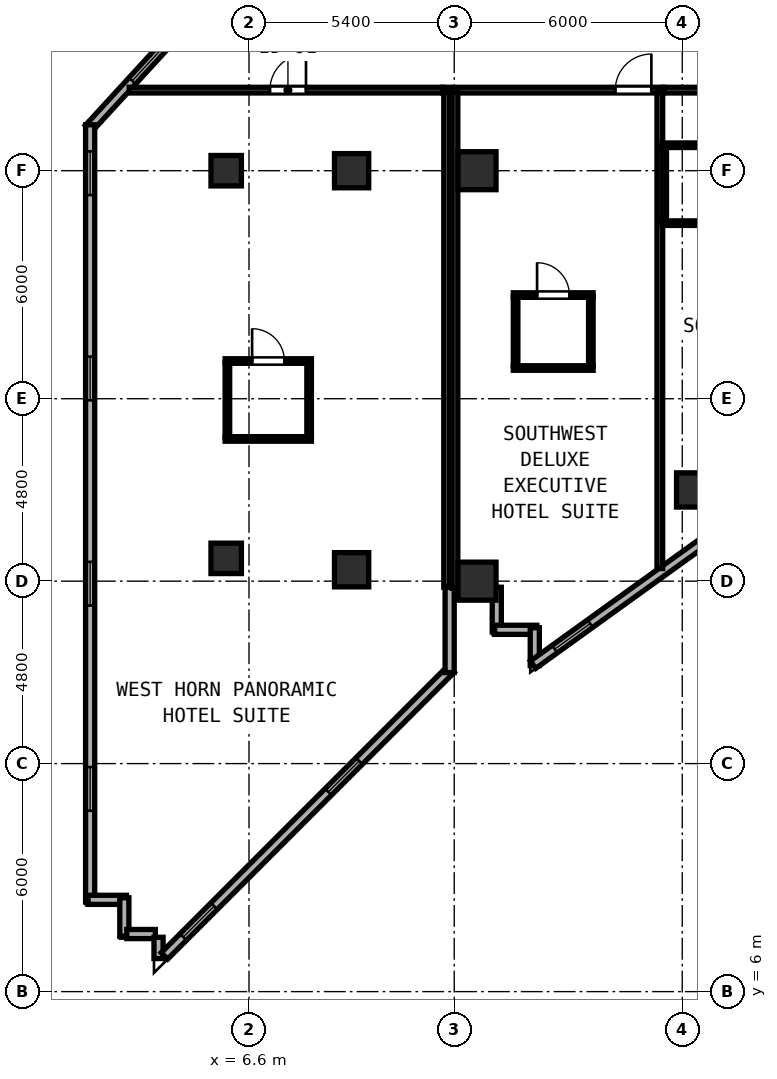
"""IFC4 building model, lengths in metres.
Left out: names, types, materials, properties, quantities, classifications, styles, units other than length and angle.
Written with IfcOpenShell. Run it as: python <this file> out.ifc"""

import sys

from ifc_helpers import new_model, si_unit, direction, frame, frame_2d, origin, origin_2d, place, context, subcontext, project, spatial, rectangle, hollow_rectangle, extrude, element, fill, save


model = new_model("IFC4")
c1 = context("Model", 3, precision=1e-05, world=origin(), true_north=direction((0.0, 1.0)))
c2 = subcontext(c1, "Body", "Model", "MODEL_VIEW")
j1 = project(units=[si_unit("LENGTHUNIT", "METRE"), si_unit("PLANEANGLEUNIT", "RADIAN")], contexts=[c1])
p1 = place(None, origin())
s1 = spatial("IfcSite", under=j1, at=p1, CompositionType="ELEMENT")
p2 = place(p1, origin())
s2 = spatial("IfcBuilding", under=s1, at=p2, CompositionType="ELEMENT")
p3 = place(p2, frame((0.0, 0.0, 113.6)))
s3 = spatial("IfcBuildingStorey", under=s2, at=p3, CompositionType="ELEMENT", Elevation=113.6)
for number, where, z_axis, x_axis in (
    (1, (12.6, 16.8, 0.0), (0.0, 0.0, 1.0), (1.0, 0.0, 0.0)),
    (2, (12.6, 27.6, 0.0), (0.0, 0.0, 1.0), (1.0, 0.0, 0.0)),
):
    element("IfcColumn", number, at=place(p3, frame(where, z_axis=z_axis, x_axis=x_axis)), inside=s3, PredefinedType="COLUMN", context=c2, shape_type="SweptSolid", body=[
        extrude(hollow_rectangle(XDim=1.0, YDim=1.0, WallThickness=0.038, at=origin_2d()), origin(), (0.0, 0.0, 1.0), 3.8),
    ])
for number, where, z_axis, x_axis in (
    (3, (6.0, 17.4, 0.0), (0.0, 0.0, 1.0), (1.0, 0.0, 0.0)),
    (4, (6.0, 27.6, 0.0), (0.0, 0.0, 1.0), (1.0, 0.0, 0.0)),
):
    element("IfcColumn", number, at=place(p3, frame(where, z_axis=z_axis, x_axis=x_axis)), inside=s3, PredefinedType="COLUMN", context=c2, shape_type="SweptSolid", body=[
        extrude(hollow_rectangle(XDim=0.8, YDim=0.8, WallThickness=0.03, at=origin_2d()), origin(), (0.0, 0.0, 1.0), 3.8),
    ])
for number, where, z_axis, x_axis in (
    (5, (18.3, 19.2, 0.0), (0.0, 0.0, 1.0), (1.0, 0.0, 0.0)),
    (6, (9.3, 17.1, 0.0), (0.0, 0.0, 1.0), (1.0, 0.0, 0.0)),
    (7, (9.3, 27.6, 0.0), (0.0, 0.0, 1.0), (1.0, 0.0, 0.0)),
):
    element("IfcColumn", number, at=place(p3, frame(where, z_axis=z_axis, x_axis=x_axis)), inside=s3, PredefinedType="COLUMN", context=c2, shape_type="SweptSolid", body=[
        extrude(hollow_rectangle(XDim=0.9, YDim=0.9, WallThickness=0.034, at=origin_2d()), origin(), (0.0, 0.0, 1.0), 3.8),
    ])
p4 = place(p3, frame((13.12, 16.64, 0.0), z_axis=(0.0, 0.0, 1.0), x_axis=(0.0, -1.0, 0.0)))
e8 = element("IfcWall", 8, at=p4, inside=s3, PredefinedType="SOLIDWALL", context=c2, shape_type="SweptSolid", body=[
    extrude(rectangle(XDim=1.175, YDim=0.24, at=frame_2d((0.587, 0.0))), origin(), (0.0, 0.0, 1.0), 3.6),
])
p5 = place(p3, frame((13.065, 15.52, 0.0), z_axis=(0.0, 0.0, 1.0), x_axis=(1.0, 0.0, 0.0)))
e9 = element("IfcWall", 9, at=p5, inside=s3, PredefinedType="SOLIDWALL", context=c2, shape_type="SweptSolid", body=[
    extrude(rectangle(XDim=1.11, YDim=0.24, at=frame_2d((0.555, 0.0))), origin(), (0.0, 0.0, 1.0), 3.6),
])
p6 = place(p3, frame((14.12, 15.575, 0.0), z_axis=(0.0, 0.0, 1.0), x_axis=(0.0, -1.0, 0.0)))
e10 = element("IfcWall", 10, at=p6, inside=s3, PredefinedType="SOLIDWALL", context=c2, shape_type="SweptSolid", body=[
    extrude(rectangle(XDim=0.996, YDim=0.24, at=frame_2d((0.498, 0.0))), origin(), (0.0, 0.0, 1.0), 3.6),
])
p7 = place(p3, frame((14.075, 14.602, 0.0), z_axis=(0.0, 0.0, 1.0), x_axis=(0.811543504691, 0.584291998913, 0.0)))
e11 = element("IfcWall", 11, at=p7, inside=s3, PredefinedType="SOLIDWALL", context=c2, shape_type="SweptSolid", body=[
    extrude(rectangle(XDim=11.623, YDim=0.24, at=frame_2d((5.812, 0.0))), origin(), (0.0, 0.0, 1.0), 3.145),
])
p8 = place(p7, frame((0.7, 0.0, 0.85)))
e12 = element("IfcOpeningElement", 12, at=p8, cuts=e11, PredefinedType="OPENING", context=c2, shape_type="SweptSolid", body=[
    extrude(rectangle(XDim=1.15, YDim=1.8, at=frame_2d((0.575, 0.9))), frame((0.0, 0.13, 0.0), z_axis=(0.0, -1.0, 0.0), x_axis=(1.0, 0.0, 0.0)), (0.0, 0.0, 1.0), 0.26),
])
p9 = place(p7, frame((6.1, 0.0, 0.85)))
e13 = element("IfcOpeningElement", 13, at=p9, cuts=e11, PredefinedType="OPENING", context=c2, shape_type="SweptSolid", body=[
    extrude(rectangle(XDim=1.15, YDim=1.8, at=frame_2d((0.575, 0.9))), frame((0.0, 0.13, 0.0), z_axis=(0.0, -1.0, 0.0), x_axis=(1.0, 0.0, 0.0)), (0.0, 0.0, 1.0), 0.26),
])
p10 = place(p3, frame((4.604, 31.136, 0.0), z_axis=(0.0, 0.0, 1.0), x_axis=(-0.675727991777, -0.737151057198, 0.0)))
e14 = element("IfcWall", 14, at=p10, inside=s3, PredefinedType="SOLIDWALL", context=c2, shape_type="SweptSolid", body=[
    extrude(rectangle(XDim=3.287, YDim=0.24, at=frame_2d((1.644, 0.0))), origin(), (0.0, 0.0, 1.0), 3.6),
])
p11 = place(p10, frame((0.439, 0.0, 0.85)))
e15 = element("IfcOpeningElement", 15, at=p11, cuts=e14, PredefinedType="OPENING", context=c2, shape_type="SweptSolid", body=[
    extrude(rectangle(XDim=1.15, YDim=1.8, at=frame_2d((0.575, 0.9))), frame((0.0, 0.13, 0.0), z_axis=(0.0, -1.0, 0.0), x_axis=(1.0, 0.0, 0.0)), (0.0, 0.0, 1.0), 0.26),
])
p12 = place(p3, frame((2.42, 28.808, 0.0), z_axis=(0.0, 0.0, 1.0), x_axis=(0.0, -1.0, 0.0)))
e16 = element("IfcWall", 16, at=p12, inside=s3, PredefinedType="SOLIDWALL", context=c2, shape_type="SweptSolid", body=[
    extrude(rectangle(XDim=20.448, YDim=0.24, at=frame_2d((10.224, 0.0))), origin(), (0.0, 0.0, 1.0), 3.6),
])
p13 = place(p12, frame((0.7, 0.0, 0.85)))
e17 = element("IfcOpeningElement", 17, at=p13, cuts=e16, PredefinedType="OPENING", context=c2, shape_type="SweptSolid", body=[
    extrude(rectangle(XDim=1.15, YDim=1.8, at=frame_2d((0.575, 0.9))), frame((0.0, 0.13, 0.0), z_axis=(0.0, -1.0, 0.0), x_axis=(1.0, 0.0, 0.0)), (0.0, 0.0, 1.0), 0.26),
])
p14 = place(p12, frame((6.1, 0.0, 0.85)))
e18 = element("IfcOpeningElement", 18, at=p14, cuts=e16, PredefinedType="OPENING", context=c2, shape_type="SweptSolid", body=[
    extrude(rectangle(XDim=1.15, YDim=1.8, at=frame_2d((0.575, 0.9))), frame((0.0, 0.13, 0.0), z_axis=(0.0, -1.0, 0.0), x_axis=(1.0, 0.0, 0.0)), (0.0, 0.0, 1.0), 0.26),
])
p15 = place(p12, frame((11.5, 0.0, 0.85)))
e19 = element("IfcOpeningElement", 19, at=p15, cuts=e16, PredefinedType="OPENING", context=c2, shape_type="SweptSolid", body=[
    extrude(rectangle(XDim=1.15, YDim=1.8, at=frame_2d((0.575, 0.9))), frame((0.0, 0.13, 0.0), z_axis=(0.0, -1.0, 0.0), x_axis=(1.0, 0.0, 0.0)), (0.0, 0.0, 1.0), 0.26),
])
p16 = place(p12, frame((16.9, 0.0, 0.85)))
e20 = element("IfcOpeningElement", 20, at=p16, cuts=e16, PredefinedType="OPENING", context=c2, shape_type="SweptSolid", body=[
    extrude(rectangle(XDim=1.15, YDim=1.8, at=frame_2d((0.575, 0.9))), frame((0.0, 0.13, 0.0), z_axis=(0.0, -1.0, 0.0), x_axis=(1.0, 0.0, 0.0)), (0.0, 0.0, 1.0), 0.26),
])
for number, where, z_axis, x_axis in (
    (21, (2.365, 8.415, 0.0), (0.0, 0.0, 1.0), (1.0, 0.0, 0.0)),
    (22, (3.32, 8.47, 0.0), (0.0, 0.0, 1.0), (0.0, -1.0, 0.0)),
):
    element("IfcWall", number, at=place(p3, frame(where, z_axis=z_axis, x_axis=x_axis)), inside=s3, PredefinedType="SOLIDWALL", context=c2, shape_type="SweptSolid", body=[
        extrude(rectangle(XDim=1.01, YDim=0.24, at=frame_2d((0.505, 0.0))), origin(), (0.0, 0.0, 1.0), 3.6),
    ])
p17 = place(p3, frame((3.385, 7.515, 0.0), z_axis=(0.0, 0.0, 1.0), x_axis=(1.0, 0.0, 0.0)))
e23 = element("IfcWall", 23, at=p17, inside=s3, PredefinedType="SOLIDWALL", context=c2, shape_type="SweptSolid", body=[
    extrude(rectangle(XDim=0.75, YDim=0.24, at=frame_2d((0.375, 0.0))), origin(), (0.0, 0.0, 1.0), 3.6),
])
p18 = place(p3, frame((4.22, 7.43, 0.0), z_axis=(0.0, 0.0, 1.0), x_axis=(0.0, -1.0, 0.0)))
e24 = element("IfcWall", 24, at=p18, inside=s3, PredefinedType="SOLIDWALL", context=c2, shape_type="SweptSolid", body=[
    extrude(rectangle(XDim=0.56, YDim=0.24, at=frame_2d((0.28, 0.0))), origin(), (0.0, 0.0, 1.0), 3.6),
])
p19 = place(p3, frame((4.375, 6.94, 0.0), z_axis=(0.0, 0.0, 1.0), x_axis=(0.706889405259, 0.70732409031, 0.0)))
e25 = element("IfcWall", 25, at=p19, inside=s3, PredefinedType="SOLIDWALL", context=c2, shape_type="SweptSolid", body=[
    extrude(rectangle(XDim=10.671, YDim=0.24, at=frame_2d((5.336, 0.0))), origin(), (0.0, 0.0, 1.0), 3.6),
])
p20 = place(p19, frame((0.7, 0.0, 0.85)))
e26 = element("IfcOpeningElement", 26, at=p20, cuts=e25, PredefinedType="OPENING", context=c2, shape_type="SweptSolid", body=[
    extrude(rectangle(XDim=1.15, YDim=1.8, at=frame_2d((0.575, 0.9))), frame((0.0, 0.13, 0.0), z_axis=(0.0, -1.0, 0.0), x_axis=(1.0, 0.0, 0.0)), (0.0, 0.0, 1.0), 0.26),
])
p21 = place(p19, frame((6.1, 0.0, 0.85)))
e27 = element("IfcOpeningElement", 27, at=p21, cuts=e25, PredefinedType="OPENING", context=c2, shape_type="SweptSolid", body=[
    extrude(rectangle(XDim=1.15, YDim=1.8, at=frame_2d((0.575, 0.9))), frame((0.0, 0.13, 0.0), z_axis=(0.0, -1.0, 0.0), x_axis=(1.0, 0.0, 0.0)), (0.0, 0.0, 1.0), 0.26),
])
p22 = place(p3, frame((11.88, 14.395, 0.0), z_axis=(0.0, 0.0, 1.0), x_axis=(0.0, 1.0, 0.0)))
e28 = element("IfcWall", 28, at=p22, inside=s3, PredefinedType="SOLIDWALL", context=c2, shape_type="SweptSolid", body=[
    extrude(rectangle(XDim=2.245, YDim=0.24, at=frame_2d((1.123, 0.0))), origin(), (0.0, 0.0, 1.0), 3.6),
])
p23 = place(p3, frame((11.7, 29.72, 0.0), z_axis=(0.0, 0.0, 1.0), x_axis=(1.0, 0.0, 0.0)))
e29 = element("IfcWall", 29, at=p23, inside=s3, PredefinedType="PARTITIONING", context=c2, shape_type="SweptSolid", body=[
    extrude(rectangle(XDim=5.81, YDim=0.15, at=frame_2d((2.905, 0.0))), origin(), (0.0, 0.0, 1.0), 3.6),
])
p24 = place(p23, frame((5.488, 0.0, 0.0), z_axis=(0.0, 0.0, 1.0), x_axis=(-1.0, 0.0, 0.0)))
e30 = element("IfcOpeningElement", 30, at=p24, cuts=e29, PredefinedType="OPENING", context=c2, shape_type="SweptSolid", body=[
    extrude(rectangle(XDim=0.95, YDim=2.18, at=frame_2d((0.475, 1.09))), frame((0.0, 0.085, 0.0), z_axis=(0.0, -1.0, 0.0), x_axis=(1.0, 0.0, 0.0)), (0.0, 0.0, 1.0), 0.17),
])
p25 = place(p3, frame((11.8, 16.642, 0.0), z_axis=(0.0, 0.0, 1.0), x_axis=(0.0, 1.0, 0.0)))
e31 = element("IfcWall", 31, at=p25, inside=s3, PredefinedType="PARTITIONING", context=c2, shape_type="SweptSolid", body=[
    extrude(rectangle(XDim=13.018, YDim=0.15, at=frame_2d((6.509, 0.0))), origin(), (0.0, 0.0, 1.0), 3.6),
])
p26 = place(p3, frame((17.41, 17.133, 0.0), z_axis=(0.0, 0.0, 1.0), x_axis=(0.0, 1.0, 0.0)))
e32 = element("IfcWall", 32, at=p26, inside=s3, PredefinedType="PARTITIONING", context=c2, shape_type="SweptSolid", body=[
    extrude(rectangle(XDim=12.527, YDim=0.15, at=frame_2d((6.264, 0.0))), origin(), (0.0, 0.0, 1.0), 3.6),
])
p27 = place(p3, frame((13.555, 24.328, 0.0), z_axis=(0.0, 0.0, 1.0), x_axis=(1.0, 0.0, 0.0)))
e33 = element("IfcWall", 33, at=p27, inside=s3, PredefinedType="PARTITIONING", context=c2, shape_type="SweptSolid", body=[
    extrude(rectangle(XDim=2.1, YDim=0.12, at=frame_2d((1.05, 0.0))), origin(), (0.0, 0.0, 1.0), 3.6),
])
p28 = place(p27, frame((1.475, 0.0, 0.0), z_axis=(0.0, 0.0, 1.0), x_axis=(-1.0, 0.0, 0.0)))
e34 = element("IfcOpeningElement", 34, at=p28, cuts=e33, PredefinedType="OPENING", context=c2, shape_type="SweptSolid", body=[
    extrude(rectangle(XDim=0.85, YDim=2.1, at=frame_2d((0.425, 1.05))), frame((0.0, 0.07, 0.0), z_axis=(0.0, -1.0, 0.0), x_axis=(1.0, 0.0, 0.0)), (0.0, 0.0, 1.0), 0.14),
])
p29 = place(p3, frame((13.555, 22.408, 0.0), z_axis=(0.0, 0.0, 1.0), x_axis=(1.0, 0.0, 0.0)))
e35 = element("IfcWall", 35, at=p29, inside=s3, PredefinedType="PARTITIONING", context=c2, shape_type="SweptSolid", body=[
    extrude(rectangle(XDim=2.1, YDim=0.12, at=frame_2d((1.05, 0.0))), origin(), (0.0, 0.0, 1.0), 3.6),
])
for number, where, z_axis, x_axis in (
    (36, (13.615, 22.453, 0.0), (0.0, 0.0, 1.0), (0.0, 1.0, 0.0)),
    (37, (15.595, 22.453, 0.0), (0.0, 0.0, 1.0), (0.0, 1.0, 0.0)),
):
    element("IfcWall", number, at=place(p3, frame(where, z_axis=z_axis, x_axis=x_axis)), inside=s3, PredefinedType="PARTITIONING", context=c2, shape_type="SweptSolid", body=[
        extrude(rectangle(XDim=1.83, YDim=0.12, at=frame_2d((0.915, 0.0))), origin(), (0.0, 0.0, 1.0), 3.6),
    ])
p30 = place(p3, frame((17.512, 29.72, 0.0), z_axis=(0.0, 0.0, 1.0), x_axis=(1.0, 0.0, 0.0)))
e38 = element("IfcWall", 38, at=p30, inside=s3, PredefinedType="PARTITIONING", context=c2, shape_type="SweptSolid", body=[
    extrude(rectangle(XDim=6.406, YDim=0.15, at=frame_2d((3.203, 0.0))), origin(), (0.0, 0.0, 1.0), 3.6),
])
p31 = place(p30, frame((2.755, 0.0, 0.0), z_axis=(0.0, 0.0, 1.0), x_axis=(-1.0, 0.0, 0.0)))
e39 = element("IfcOpeningElement", 39, at=p31, cuts=e38, PredefinedType="OPENING", context=c2, shape_type="SweptSolid", body=[
    extrude(rectangle(XDim=0.95, YDim=2.18, at=frame_2d((0.475, 1.09))), frame((0.0, 0.085, 0.0), z_axis=(0.0, -1.0, 0.0), x_axis=(1.0, 0.0, 0.0)), (0.0, 0.0, 1.0), 0.17),
])
for number, where, z_axis, x_axis in (
    (40, (17.47, 28.27, 0.0), (0.0, 0.0, 1.0), (1.0, 0.0, 0.0)),
    (41, (17.47, 26.22, 0.0), (0.0, 0.0, 1.0), (1.0, 0.0, 0.0)),
):
    element("IfcWall", number, at=place(p3, frame(where, z_axis=z_axis, x_axis=x_axis)), inside=s3, PredefinedType="PARTITIONING", context=c2, shape_type="SweptSolid", body=[
        extrude(rectangle(XDim=2.265, YDim=0.12, at=frame_2d((1.133, 0.0))), origin(), (0.0, 0.0, 1.0), 3.6),
    ])
p32 = place(p3, frame((17.525, 26.265, 0.0), z_axis=(0.0, 0.0, 1.0), x_axis=(0.0, 1.0, 0.0)))
e42 = element("IfcWall", 42, at=p32, inside=s3, PredefinedType="PARTITIONING", context=c2, shape_type="SweptSolid", body=[
    extrude(rectangle(XDim=1.96, YDim=0.12, at=frame_2d((0.98, 0.0))), origin(), (0.0, 0.0, 1.0), 3.6),
])
p33 = place(p3, frame((3.448, 29.72, 0.0), z_axis=(0.0, 0.0, 1.0), x_axis=(1.0, 0.0, 0.0)))
e43 = element("IfcWall", 43, at=p33, inside=s3, PredefinedType="PARTITIONING", context=c2, shape_type="SweptSolid", body=[
    extrude(rectangle(XDim=8.25, YDim=0.15, at=frame_2d((4.125, 0.0))), origin(), (0.0, 0.0, 1.0), 3.6),
])
p34 = place(p33, frame((4.651, 0.0, 0.0), z_axis=(0.0, 0.0, 1.0), x_axis=(-1.0, 0.0, 0.0)))
e44 = element("IfcOpeningElement", 44, at=p34, cuts=e43, PredefinedType="OPENING", context=c2, shape_type="SweptSolid", body=[
    extrude(rectangle(XDim=0.95, YDim=2.18, at=frame_2d((0.475, 1.09))), frame((0.0, 0.085, 0.0), z_axis=(0.0, -1.0, 0.0), x_axis=(1.0, 0.0, 0.0)), (0.0, 0.0, 1.0), 0.17),
])
p35 = place(p3, frame((12.02, 16.612, 0.0), z_axis=(0.0, 0.0, 1.0), x_axis=(0.0, 1.0, 0.0)))
e45 = element("IfcWall", 45, at=p35, inside=s3, PredefinedType="PARTITIONING", context=c2, shape_type="SweptSolid", body=[
    extrude(rectangle(XDim=13.048, YDim=0.15, at=frame_2d((6.524, 0.0))), origin(), (0.0, 0.0, 1.0), 3.6),
])
p36 = place(p3, frame((5.972, 22.592, 0.0), z_axis=(0.0, 0.0, 1.0), x_axis=(1.0, 0.0, 0.0)))
e46 = element("IfcWall", 46, at=p36, inside=s3, PredefinedType="PARTITIONING", context=c2, shape_type="SweptSolid", body=[
    extrude(rectangle(XDim=2.27, YDim=0.12, at=frame_2d((1.135, 0.0))), origin(), (0.0, 0.0, 1.0), 3.6),
])
p37 = place(p36, frame((1.56, 0.0, 0.0), z_axis=(0.0, 0.0, 1.0), x_axis=(-1.0, 0.0, 0.0)))
e47 = element("IfcOpeningElement", 47, at=p37, cuts=e46, PredefinedType="OPENING", context=c2, shape_type="SweptSolid", body=[
    extrude(rectangle(XDim=0.85, YDim=2.1, at=frame_2d((0.425, 1.05))), frame((0.0, 0.07, 0.0), z_axis=(0.0, -1.0, 0.0), x_axis=(1.0, 0.0, 0.0)), (0.0, 0.0, 1.0), 0.14),
])
p38 = place(p3, frame((5.972, 20.542, 0.0), z_axis=(0.0, 0.0, 1.0), x_axis=(1.0, 0.0, 0.0)))
e48 = element("IfcWall", 48, at=p38, inside=s3, PredefinedType="PARTITIONING", context=c2, shape_type="SweptSolid", body=[
    extrude(rectangle(XDim=2.27, YDim=0.12, at=frame_2d((1.135, 0.0))), origin(), (0.0, 0.0, 1.0), 3.6),
])
p39 = place(p3, frame((6.032, 20.587, 0.0), z_axis=(0.0, 0.0, 1.0), x_axis=(0.0, 1.0, 0.0)))
e49 = element("IfcWall", 49, at=p39, inside=s3, PredefinedType="PARTITIONING", context=c2, shape_type="SweptSolid", body=[
    extrude(rectangle(XDim=1.96, YDim=0.12, at=frame_2d((0.98, 0.0))), origin(), (0.0, 0.0, 1.0), 3.145),
])
p40 = place(p3, frame((8.182, 20.587, 0.0), z_axis=(0.0, 0.0, 1.0), x_axis=(0.0, 1.0, 0.0)))
e50 = element("IfcWall", 50, at=p40, inside=s3, PredefinedType="PARTITIONING", context=c2, shape_type="SweptSolid", body=[
    extrude(rectangle(XDim=1.96, YDim=0.12, at=frame_2d((0.98, 0.0))), origin(), (0.0, 0.0, 1.0), 3.6),
])
p41 = place(p8, origin())
e51 = element("IfcWindow", 51, at=p41, inside=s3, PartitioningType="SINGLE_PANEL", PredefinedType="WINDOW", context=c2, shape_type="SweptSolid", body=[
    extrude(rectangle(XDim=1.15, YDim=1.8, at=frame_2d((0.575, 0.9))), frame((0.0, 0.03, 0.0), z_axis=(0.0, -1.0, 0.0), x_axis=(1.0, 0.0, 0.0)), (0.0, 0.0, 1.0), 0.06),
])
fill(e12, e51)
p42 = place(p11, origin())
e52 = element("IfcWindow", 52, at=p42, inside=s3, PartitioningType="SINGLE_PANEL", PredefinedType="WINDOW", context=c2, shape_type="SweptSolid", body=[
    extrude(rectangle(XDim=1.15, YDim=1.8, at=frame_2d((0.575, 0.9))), frame((0.0, 0.03, 0.0), z_axis=(0.0, -1.0, 0.0), x_axis=(1.0, 0.0, 0.0)), (0.0, 0.0, 1.0), 0.06),
])
fill(e15, e52)
p43 = place(p13, origin())
e53 = element("IfcWindow", 53, at=p43, inside=s3, PartitioningType="SINGLE_PANEL", PredefinedType="WINDOW", context=c2, shape_type="SweptSolid", body=[
    extrude(rectangle(XDim=1.15, YDim=1.8, at=frame_2d((0.575, 0.9))), frame((0.0, 0.03, 0.0), z_axis=(0.0, -1.0, 0.0), x_axis=(1.0, 0.0, 0.0)), (0.0, 0.0, 1.0), 0.06),
])
fill(e17, e53)
p44 = place(p14, origin())
e54 = element("IfcWindow", 54, at=p44, inside=s3, PartitioningType="SINGLE_PANEL", PredefinedType="WINDOW", context=c2, shape_type="SweptSolid", body=[
    extrude(rectangle(XDim=1.15, YDim=1.8, at=frame_2d((0.575, 0.9))), frame((0.0, 0.03, 0.0), z_axis=(0.0, -1.0, 0.0), x_axis=(1.0, 0.0, 0.0)), (0.0, 0.0, 1.0), 0.06),
])
fill(e18, e54)
p45 = place(p15, origin())
e55 = element("IfcWindow", 55, at=p45, inside=s3, PartitioningType="SINGLE_PANEL", PredefinedType="WINDOW", context=c2, shape_type="SweptSolid", body=[
    extrude(rectangle(XDim=1.15, YDim=1.8, at=frame_2d((0.575, 0.9))), frame((0.0, 0.03, 0.0), z_axis=(0.0, -1.0, 0.0), x_axis=(1.0, 0.0, 0.0)), (0.0, 0.0, 1.0), 0.06),
])
fill(e19, e55)
p46 = place(p16, origin())
e56 = element("IfcWindow", 56, at=p46, inside=s3, PartitioningType="SINGLE_PANEL", PredefinedType="WINDOW", context=c2, shape_type="SweptSolid", body=[
    extrude(rectangle(XDim=1.15, YDim=1.8, at=frame_2d((0.575, 0.9))), frame((0.0, 0.03, 0.0), z_axis=(0.0, -1.0, 0.0), x_axis=(1.0, 0.0, 0.0)), (0.0, 0.0, 1.0), 0.06),
])
fill(e20, e56)
p47 = place(p20, origin())
e57 = element("IfcWindow", 57, at=p47, inside=s3, PartitioningType="SINGLE_PANEL", PredefinedType="WINDOW", context=c2, shape_type="SweptSolid", body=[
    extrude(rectangle(XDim=1.15, YDim=1.8, at=frame_2d((0.575, 0.9))), frame((0.0, 0.03, 0.0), z_axis=(0.0, -1.0, 0.0), x_axis=(1.0, 0.0, 0.0)), (0.0, 0.0, 1.0), 0.06),
])
fill(e26, e57)
p48 = place(p21, origin())
e58 = element("IfcWindow", 58, at=p48, inside=s3, PartitioningType="SINGLE_PANEL", PredefinedType="WINDOW", context=c2, shape_type="SweptSolid", body=[
    extrude(rectangle(XDim=1.15, YDim=1.8, at=frame_2d((0.575, 0.9))), frame((0.0, 0.03, 0.0), z_axis=(0.0, -1.0, 0.0), x_axis=(1.0, 0.0, 0.0)), (0.0, 0.0, 1.0), 0.06),
])
fill(e27, e58)
p49 = place(p24, origin())
e59 = element("IfcDoor", 59, at=p49, inside=s3, OperationType="SINGLE_SWING_LEFT", PredefinedType="DOOR", context=c2, shape_type="SweptSolid", body=[
    extrude(rectangle(XDim=0.95, YDim=2.18, at=frame_2d((0.475, 1.09))), frame((0.0, 0.025, 0.0), z_axis=(0.0, -1.0, 0.0), x_axis=(1.0, 0.0, 0.0)), (0.0, 0.0, 1.0), 0.05),
])
fill(e30, e59)
p50 = place(p28, origin())
e60 = element("IfcDoor", 60, at=p50, inside=s3, OperationType="SINGLE_SWING_RIGHT", PredefinedType="DOOR", context=c2, shape_type="SweptSolid", body=[
    extrude(rectangle(XDim=0.85, YDim=2.1, at=frame_2d((0.425, 1.05))), frame((0.0, 0.025, 0.0), z_axis=(0.0, -1.0, 0.0), x_axis=(1.0, 0.0, 0.0)), (0.0, 0.0, 1.0), 0.05),
])
fill(e34, e60)
p51 = place(p34, origin())
e61 = element("IfcDoor", 61, at=p51, inside=s3, OperationType="SINGLE_SWING_LEFT", PredefinedType="DOOR", context=c2, shape_type="SweptSolid", body=[
    extrude(rectangle(XDim=0.95, YDim=2.18, at=frame_2d((0.475, 1.09))), frame((0.0, 0.025, 0.0), z_axis=(0.0, -1.0, 0.0), x_axis=(1.0, 0.0, 0.0)), (0.0, 0.0, 1.0), 0.05),
])
fill(e44, e61)
p52 = place(p37, origin())
e62 = element("IfcDoor", 62, at=p52, inside=s3, OperationType="SINGLE_SWING_RIGHT", PredefinedType="DOOR", context=c2, shape_type="SweptSolid", body=[
    extrude(rectangle(XDim=0.85, YDim=2.1, at=frame_2d((0.425, 1.05))), frame((0.0, 0.025, 0.0), z_axis=(0.0, -1.0, 0.0), x_axis=(1.0, 0.0, 0.0)), (0.0, 0.0, 1.0), 0.05),
])
fill(e47, e62)
save(model, sys.argv[1])
